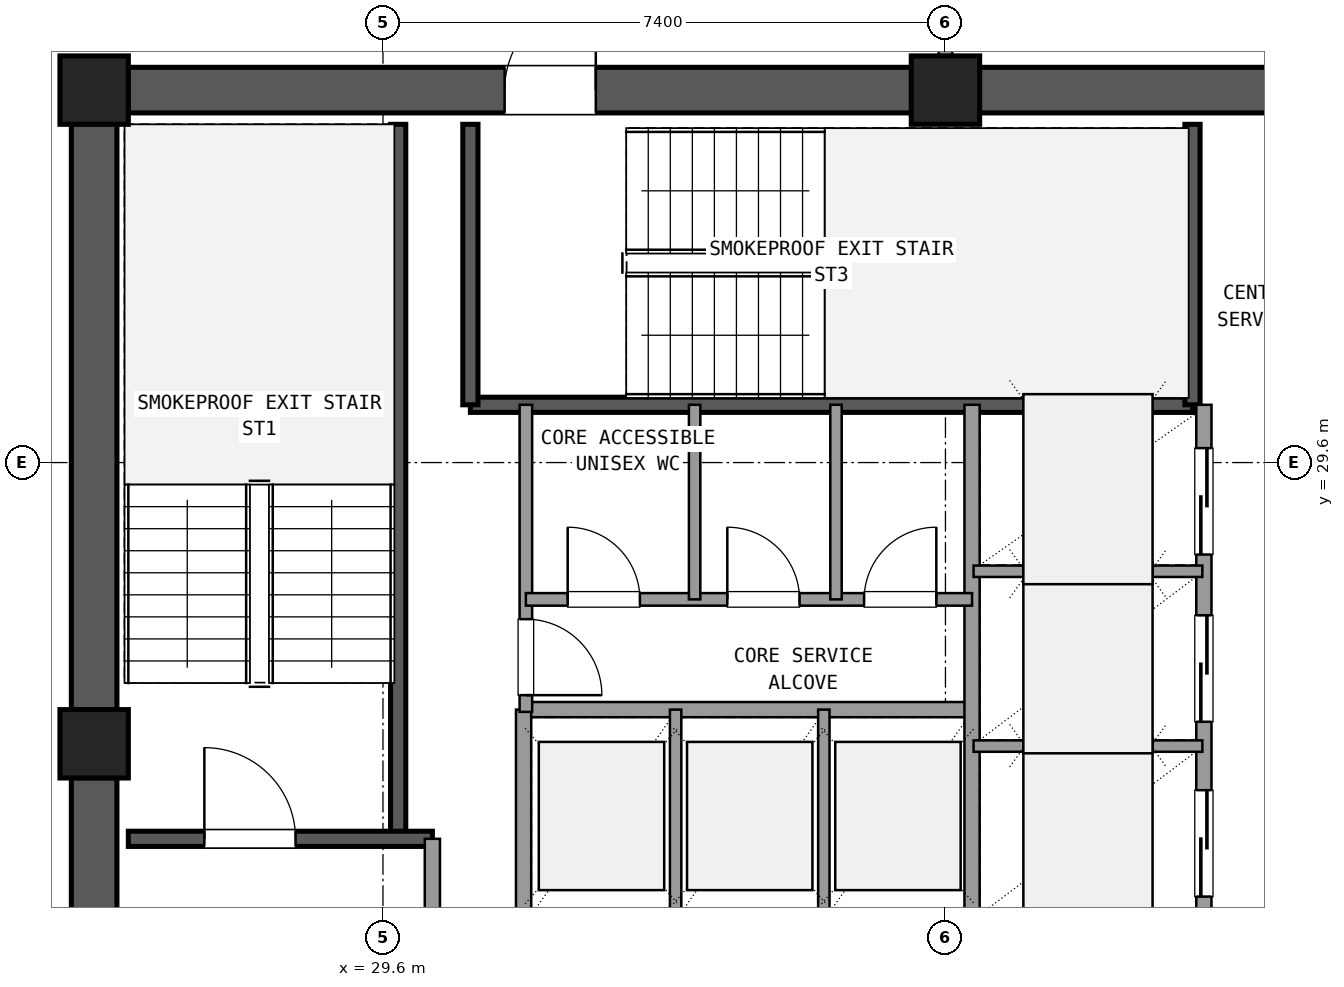
"""IFC4 building model, lengths in metres.
Left out: names, types, materials, properties, quantities, classifications, styles, units other than length and angle.
Written with IfcOpenShell. Run it as: python <this file> out.ifc"""

import sys

from ifc_helpers import new_model, si_unit, direction, frame, frame_2d, origin, origin_2d, place, context, subcontext, project, spatial, rectangle, extrude, element, fill, save


model = new_model("IFC4")
c1 = context("Model", 3, precision=1e-05, world=origin(), true_north=direction((0.0, 1.0)))
c2 = subcontext(c1, "Body", "Model", "MODEL_VIEW")
j1 = project(units=[si_unit("LENGTHUNIT", "METRE"), si_unit("PLANEANGLEUNIT", "RADIAN")], contexts=[c1])
p1 = place(None, origin())
s1 = spatial("IfcSite", under=j1, at=p1, CompositionType="ELEMENT")
p2 = place(p1, origin())
s2 = spatial("IfcBuilding", under=s1, at=p2, CompositionType="ELEMENT")
p3 = place(p2, frame((0.0, 0.0, 214.38)))
s3 = spatial("IfcBuildingStorey", under=s2, at=p3, CompositionType="ELEMENT", Elevation=214.38)
for number, where, z_axis, x_axis in (
    (1, (37.0, 34.5, 0.0), (0.0, 0.0, 1.0), (1.0, 0.0, 0.0)),
    (2, (25.8, 34.5, 0.0), (0.0, 0.0, 1.0), (1.0, 0.0, 0.0)),
    (3, (25.8, 25.9, 0.0), (0.0, 0.0, 1.0), (1.0, 0.0, 0.0)),
):
    element("IfcColumn", number, at=place(p3, frame(where, z_axis=z_axis, x_axis=x_axis)), inside=s3, PredefinedType="COLUMN", context=c2, shape_type="SweptSolid", body=[
        extrude(rectangle(XDim=0.9, YDim=0.9, at=origin_2d()), origin(), (0.0, 0.0, 1.0), 3.6),
    ])
p4 = place(p3, frame((47.755, 34.5, 0.0), z_axis=(0.0, 0.0, 1.0), x_axis=(-1.0, 0.0, 0.0)))
e4 = element("IfcWall", 4, at=p4, inside=s3, PredefinedType="SHEAR", context=c2, shape_type="SweptSolid", body=[
    extrude(rectangle(XDim=10.31, YDim=0.6, at=frame_2d((5.155, 0.0))), origin(), (0.0, 0.0, 1.0), 3.32),
])
p5 = place(p4, frame((4.655, 0.0, 0.0)))
e5 = element("IfcOpeningElement", 5, at=p5, cuts=e4, PredefinedType="OPENING", context=c2, shape_type="SweptSolid", body=[
    extrude(rectangle(XDim=1.6, YDim=2.2, at=frame_2d((0.8, 1.1))), frame((0.0, 0.31, 0.0), z_axis=(0.0, -1.0, 0.0), x_axis=(1.0, 0.0, 0.0)), (0.0, 0.0, 1.0), 0.62),
])
p6 = place(p3, frame((36.555, 34.5, 0.0), z_axis=(0.0, 0.0, 1.0), x_axis=(-1.0, 0.0, 0.0)))
e6 = element("IfcWall", 6, at=p6, inside=s3, PredefinedType="SHEAR", context=c2, shape_type="SweptSolid", body=[
    extrude(rectangle(XDim=10.31, YDim=0.6, at=frame_2d((5.155, 0.0))), origin(), (0.0, 0.0, 1.0), 3.32),
])
p7 = place(p6, frame((4.155, 0.0, 0.0)))
e7 = element("IfcOpeningElement", 7, at=p7, cuts=e6, PredefinedType="OPENING", context=c2, shape_type="SweptSolid", body=[
    extrude(rectangle(XDim=1.2, YDim=2.15, at=frame_2d((0.6, 1.075))), frame((0.0, 0.31, 0.0), z_axis=(0.0, -1.0, 0.0), x_axis=(1.0, 0.0, 0.0)), (0.0, 0.0, 1.0), 0.62),
])
p8 = place(p3, frame((25.8, 34.055, 0.0), z_axis=(0.0, 0.0, 1.0), x_axis=(0.0, -1.0, 0.0)))
e8 = element("IfcWall", 8, at=p8, inside=s3, PredefinedType="SHEAR", context=c2, shape_type="SweptSolid", body=[
    extrude(rectangle(XDim=7.71, YDim=0.6, at=frame_2d((3.855, 0.0))), origin(), (0.0, 0.0, 1.0), 3.32),
])
p9 = place(p3, frame((25.8, 25.455, 0.0), z_axis=(0.0, 0.0, 1.0), x_axis=(0.0, -1.0, 0.0)))
e9 = element("IfcWall", 9, at=p9, inside=s3, PredefinedType="SHEAR", context=c2, shape_type="SweptSolid", body=[
    extrude(rectangle(XDim=7.71, YDim=0.6, at=frame_2d((3.855, 0.0))), origin(), (0.0, 0.0, 1.0), 3.32),
])
p10 = place(p9, frame((2.205, 0.0, 0.0)))
e10 = element("IfcOpeningElement", 10, at=p10, cuts=e9, PredefinedType="OPENING", context=c2, shape_type="SweptSolid", body=[
    extrude(rectangle(XDim=1.2, YDim=2.15, at=frame_2d((0.6, 1.075))), frame((0.0, 0.31, 0.0), z_axis=(0.0, -1.0, 0.0), x_axis=(1.0, 0.0, 0.0)), (0.0, 0.0, 1.0), 0.62),
])
p11 = place(p3, frame((29.8, 24.65, 0.0), z_axis=(0.0, 0.0, 1.0), x_axis=(0.0, 1.0, 0.0)))
e11 = element("IfcWall", 11, at=p11, inside=s3, PredefinedType="SHEAR", context=c2, shape_type="SweptSolid", body=[
    extrude(rectangle(XDim=9.4, YDim=0.2, at=frame_2d((4.7, 0.0))), origin(), (0.0, 0.0, 1.0), 3.32),
])
p12 = place(p3, frame((26.25, 24.65, 0.0), z_axis=(0.0, 0.0, 1.0), x_axis=(1.0, 0.0, 0.0)))
e12 = element("IfcWall", 12, at=p12, inside=s3, PredefinedType="SHEAR", context=c2, shape_type="SweptSolid", body=[
    extrude(rectangle(XDim=4.0, YDim=0.2, at=frame_2d((2.0, 0.0))), origin(), (0.0, 0.0, 1.0), 3.32),
])
p13 = place(p12, frame((1.0, 0.0, 0.0)))
e13 = element("IfcOpeningElement", 13, at=p13, cuts=e12, PredefinedType="OPENING", context=c2, shape_type="SweptSolid", body=[
    extrude(rectangle(XDim=1.2, YDim=2.15, at=frame_2d((0.6, 1.075))), frame((0.0, 0.11, 0.0), z_axis=(0.0, -1.0, 0.0), x_axis=(1.0, 0.0, 0.0)), (0.0, 0.0, 1.0), 0.22),
])
p14 = place(p3, frame((30.75, 30.36, 0.0), z_axis=(0.0, 0.0, 1.0), x_axis=(1.0, 0.0, 0.0)))
e14 = element("IfcWall", 14, at=p14, inside=s3, PredefinedType="SHEAR", context=c2, shape_type="SweptSolid", body=[
    extrude(rectangle(XDim=9.5, YDim=0.2, at=frame_2d((4.75, 0.0))), origin(), (0.0, 0.0, 1.0), 3.32),
])
for number, where, z_axis, x_axis in (
    (15, (30.75, 30.36, 0.0), (0.0, 0.0, 1.0), (0.0, 1.0, 0.0)),
    (16, (40.25, 30.36, 0.0), (0.0, 0.0, 1.0), (0.0, 1.0, 0.0)),
):
    element("IfcWall", number, at=place(p3, frame(where, z_axis=z_axis, x_axis=x_axis)), inside=s3, PredefinedType="SHEAR", context=c2, shape_type="SweptSolid", body=[
        extrude(rectangle(XDim=3.69, YDim=0.2, at=frame_2d((1.845, 0.0))), origin(), (0.0, 0.0, 1.0), 3.32),
    ])
p15 = place(p3, frame((30.25, 17.75, 0.0), z_axis=(0.0, 0.0, 1.0), x_axis=(0.0, 1.0, 0.0)))
e17 = element("IfcWall", 17, at=p15, inside=s3, PredefinedType="SOLIDWALL", context=c2, shape_type="SweptSolid", body=[
    extrude(rectangle(XDim=6.9, YDim=0.2, at=frame_2d((3.45, 0.0))), origin(), (0.0, 0.0, 1.0), 2.61),
])
p16 = place(p15, frame((4.15, 0.0, 0.0)))
e18 = element("IfcOpeningElement", 18, at=p16, cuts=e17, PredefinedType="OPENING", context=c2, shape_type="SweptSolid", body=[
    extrude(rectangle(XDim=1.2, YDim=2.15, at=frame_2d((0.6, 1.075))), frame((0.0, 0.11, 0.0), z_axis=(0.0, -1.0, 0.0), x_axis=(1.0, 0.0, 0.0)), (0.0, 0.0, 1.0), 0.22),
])
p17 = place(p3, frame((31.45, 26.35, 0.0), z_axis=(0.0, 0.0, 1.0), x_axis=(1.0, 0.0, 0.0)))
e19 = element("IfcWall", 19, at=p17, inside=s3, PredefinedType="SOLIDWALL", context=c2, shape_type="SweptSolid", body=[
    extrude(rectangle(XDim=5.9, YDim=0.2, at=frame_2d((2.95, 0.0))), origin(), (0.0, 0.0, 1.0), 2.61),
])
p18 = place(p3, frame((31.45, 23.54, 0.0), z_axis=(0.0, 0.0, 1.0), x_axis=(0.0, 1.0, 0.0)))
e20 = element("IfcWall", 20, at=p18, inside=s3, PredefinedType="SOLIDWALL", context=c2, shape_type="SweptSolid", body=[
    extrude(rectangle(XDim=2.81, YDim=0.2, at=frame_2d((1.405, 0.0))), origin(), (0.0, 0.0, 1.0), 2.61),
])
for number, where, z_axis, x_axis in (
    (21, (33.45, 23.54, 0.0), (0.0, 0.0, 1.0), (0.0, 1.0, 0.0)),
    (22, (35.4, 23.54, 0.0), (0.0, 0.0, 1.0), (0.0, 1.0, 0.0)),
):
    element("IfcWall", number, at=place(p3, frame(where, z_axis=z_axis, x_axis=x_axis)), inside=s3, PredefinedType="PARTITIONING", context=c2, shape_type="SweptSolid", body=[
        extrude(rectangle(XDim=2.81, YDim=0.15, at=frame_2d((1.405, 0.0))), origin(), (0.0, 0.0, 1.0), 2.61),
    ])
p19 = place(p3, frame((37.35, 23.54, 0.0), z_axis=(0.0, 0.0, 1.0), x_axis=(0.0, 1.0, 0.0)))
e23 = element("IfcWall", 23, at=p19, inside=s3, PredefinedType="SOLIDWALL", context=c2, shape_type="SweptSolid", body=[
    extrude(rectangle(XDim=6.82, YDim=0.2, at=frame_2d((3.41, 0.0))), origin(), (0.0, 0.0, 1.0), 2.61),
])
p20 = place(p3, frame((40.4, 23.54, 0.0), z_axis=(0.0, 0.0, 1.0), x_axis=(0.0, 1.0, 0.0)))
e24 = element("IfcWall", 24, at=p20, inside=s3, PredefinedType="SOLIDWALL", context=c2, shape_type="SweptSolid", body=[
    extrude(rectangle(XDim=6.82, YDim=0.2, at=frame_2d((3.41, 0.0))), origin(), (0.0, 0.0, 1.0), 2.61),
])
p21 = place(p20, frame((0.35, 0.0, 0.0)))
e25 = element("IfcOpeningElement", 25, at=p21, cuts=e24, PredefinedType="OPENING", context=c2, shape_type="SweptSolid", body=[
    extrude(rectangle(XDim=1.4, YDim=2.2, at=frame_2d((0.7, 1.1))), frame((0.0, 0.11, 0.0), z_axis=(0.0, -1.0, 0.0), x_axis=(1.0, 0.0, 0.0)), (0.0, 0.0, 1.0), 0.22),
])
p22 = place(p20, frame((2.65, 0.0, 0.0)))
e26 = element("IfcOpeningElement", 26, at=p22, cuts=e24, PredefinedType="OPENING", context=c2, shape_type="SweptSolid", body=[
    extrude(rectangle(XDim=1.4, YDim=2.2, at=frame_2d((0.7, 1.1))), frame((0.0, 0.11, 0.0), z_axis=(0.0, -1.0, 0.0), x_axis=(1.0, 0.0, 0.0)), (0.0, 0.0, 1.0), 0.22),
])
p23 = place(p20, frame((4.85, 0.0, 0.0)))
e27 = element("IfcOpeningElement", 27, at=p23, cuts=e24, PredefinedType="OPENING", context=c2, shape_type="SweptSolid", body=[
    extrude(rectangle(XDim=1.4, YDim=2.2, at=frame_2d((0.7, 1.1))), frame((0.0, 0.11, 0.0), z_axis=(0.0, -1.0, 0.0), x_axis=(1.0, 0.0, 0.0)), (0.0, 0.0, 1.0), 0.22),
])
for number, where, z_axis, x_axis in (
    (28, (37.37, 25.87, 0.0), (0.0, 0.0, 1.0), (1.0, 0.0, 0.0)),
    (29, (37.37, 28.17, 0.0), (0.0, 0.0, 1.0), (1.0, 0.0, 0.0)),
):
    element("IfcWall", number, at=place(p3, frame(where, z_axis=z_axis, x_axis=x_axis)), inside=s3, PredefinedType="PARTITIONING", context=c2, shape_type="SweptSolid", body=[
        extrude(rectangle(XDim=3.01, YDim=0.15, at=frame_2d((1.505, 0.0))), origin(), (0.0, 0.0, 1.0), 2.61),
    ])
p24 = place(p3, frame((31.48, 26.32, 0.0), z_axis=(0.0, 0.0, 1.0), x_axis=(0.0, 1.0, 0.0)))
e30 = element("IfcWall", 30, at=p24, inside=s3, PredefinedType="PLUMBINGWALL", context=c2, shape_type="SweptSolid", body=[
    extrude(rectangle(XDim=4.04, YDim=0.165, at=frame_2d((2.02, 0.0))), origin(), (0.0, 0.0, 1.0), 2.61),
])
p25 = place(p24, frame((0.22, 0.0, 0.0)))
e31 = element("IfcOpeningElement", 31, at=p25, cuts=e30, PredefinedType="OPENING", context=c2, shape_type="SweptSolid", body=[
    extrude(rectangle(XDim=1.0, YDim=2.15, at=frame_2d((0.5, 1.075))), frame((0.0, 0.093, 0.0), z_axis=(0.0, -1.0, 0.0), x_axis=(1.0, 0.0, 0.0)), (0.0, 0.0, 1.0), 0.185),
])
p26 = place(p3, frame((31.48, 27.8, 0.0), z_axis=(0.0, 0.0, 1.0), x_axis=(1.0, 0.0, 0.0)))
e32 = element("IfcWall", 32, at=p26, inside=s3, PredefinedType="PLUMBINGWALL", context=c2, shape_type="SweptSolid", body=[
    extrude(rectangle(XDim=5.87, YDim=0.165, at=frame_2d((2.935, 0.0))), origin(), (0.0, 0.0, 1.0), 2.61),
])
p27 = place(p26, frame((0.55, 0.0, 0.0)))
e33 = element("IfcOpeningElement", 33, at=p27, cuts=e32, PredefinedType="OPENING", context=c2, shape_type="SweptSolid", body=[
    extrude(rectangle(XDim=0.95, YDim=2.1, at=frame_2d((0.475, 1.05))), frame((0.0, 0.093, 0.0), z_axis=(0.0, -1.0, 0.0), x_axis=(1.0, 0.0, 0.0)), (0.0, 0.0, 1.0), 0.185),
])
p28 = place(p26, frame((2.65, 0.0, 0.0)))
e34 = element("IfcOpeningElement", 34, at=p28, cuts=e32, PredefinedType="OPENING", context=c2, shape_type="SweptSolid", body=[
    extrude(rectangle(XDim=0.95, YDim=2.1, at=frame_2d((0.475, 1.05))), frame((0.0, 0.093, 0.0), z_axis=(0.0, -1.0, 0.0), x_axis=(1.0, 0.0, 0.0)), (0.0, 0.0, 1.0), 0.185),
])
p29 = place(p26, frame((4.45, 0.0, 0.0)))
e35 = element("IfcOpeningElement", 35, at=p29, cuts=e32, PredefinedType="OPENING", context=c2, shape_type="SweptSolid", body=[
    extrude(rectangle(XDim=0.95, YDim=2.1, at=frame_2d((0.475, 1.05))), frame((0.0, 0.093, 0.0), z_axis=(0.0, -1.0, 0.0), x_axis=(1.0, 0.0, 0.0)), (0.0, 0.0, 1.0), 0.185),
])
for number, where, z_axis, x_axis in (
    (36, (33.7, 27.8, 0.0), (0.0, 0.0, 1.0), (0.0, 1.0, 0.0)),
    (37, (35.56, 27.8, 0.0), (0.0, 0.0, 1.0), (0.0, 1.0, 0.0)),
):
    element("IfcWall", number, at=place(p3, frame(where, z_axis=z_axis, x_axis=x_axis)), inside=s3, PredefinedType="PARTITIONING", context=c2, shape_type="SweptSolid", body=[
        extrude(rectangle(XDim=2.56, YDim=0.15, at=frame_2d((1.28, 0.0))), origin(), (0.0, 0.0, 1.0), 2.61),
    ])
p30 = place(p3, frame((37.0, 34.95, 0.0), z_axis=(0.0, 0.0, 1.0), x_axis=(0.0, 1.0, 0.0)))
e38 = element("IfcWall", 38, at=p30, inside=s3, PredefinedType="PARTITIONING", context=c2, shape_type="SweptSolid", body=[
    extrude(rectangle(XDim=2.7, YDim=0.18, at=frame_2d((1.35, 0.0))), origin(), (0.0, 0.0, 1.0), 2.61),
])
p31 = place(p30, frame((0.35, 0.0, 0.0)))
e39 = element("IfcOpeningElement", 39, at=p31, cuts=e38, PredefinedType="OPENING", context=c2, shape_type="SweptSolid", body=[
    extrude(rectangle(XDim=2.0, YDim=2.2, at=frame_2d((1.0, 1.1))), frame((0.0, 0.1, 0.0), z_axis=(0.0, -1.0, 0.0), x_axis=(1.0, 0.0, 0.0)), (0.0, 0.0, 1.0), 0.2),
])
p32 = place(p13, origin())
e40 = element("IfcDoor", 40, at=p32, inside=s3, OperationType="SINGLE_SWING_LEFT", PredefinedType="DOOR", context=c2, shape_type="SweptSolid", body=[
    extrude(rectangle(XDim=1.2, YDim=2.15, at=frame_2d((0.6, 1.075))), frame((0.0, 0.025, 0.0), z_axis=(0.0, -1.0, 0.0), x_axis=(1.0, 0.0, 0.0)), (0.0, 0.0, 1.0), 0.05),
])
fill(e13, e40)
p33 = place(p7, frame((1.2, 0.0, 0.0), z_axis=(0.0, 0.0, 1.0), x_axis=(-1.0, 0.0, 0.0)))
e41 = element("IfcDoor", 41, at=p33, inside=s3, OperationType="SINGLE_SWING_LEFT", PredefinedType="DOOR", context=c2, shape_type="SweptSolid", body=[
    extrude(rectangle(XDim=1.2, YDim=2.15, at=frame_2d((0.6, 1.075))), frame((0.0, 0.025, 0.0), z_axis=(0.0, -1.0, 0.0), x_axis=(1.0, 0.0, 0.0)), (0.0, 0.0, 1.0), 0.05),
])
fill(e7, e41)
p34 = place(p21, origin())
e42 = element("IfcDoor", 42, at=p34, inside=s3, OperationType="SLIDING_TO_LEFT", PredefinedType="DOOR", context=c2, shape_type="SweptSolid", body=[
    extrude(rectangle(XDim=1.4, YDim=2.2, at=frame_2d((0.7, 1.1))), frame((0.0, 0.025, 0.0), z_axis=(0.0, -1.0, 0.0), x_axis=(1.0, 0.0, 0.0)), (0.0, 0.0, 1.0), 0.05),
])
fill(e25, e42)
p35 = place(p22, origin())
e43 = element("IfcDoor", 43, at=p35, inside=s3, OperationType="SLIDING_TO_LEFT", PredefinedType="DOOR", context=c2, shape_type="SweptSolid", body=[
    extrude(rectangle(XDim=1.4, YDim=2.2, at=frame_2d((0.7, 1.1))), frame((0.0, 0.025, 0.0), z_axis=(0.0, -1.0, 0.0), x_axis=(1.0, 0.0, 0.0)), (0.0, 0.0, 1.0), 0.05),
])
fill(e26, e43)
p36 = place(p23, origin())
e44 = element("IfcDoor", 44, at=p36, inside=s3, OperationType="SLIDING_TO_RIGHT", PredefinedType="DOOR", context=c2, shape_type="SweptSolid", body=[
    extrude(rectangle(XDim=1.4, YDim=2.2, at=frame_2d((0.7, 1.1))), frame((0.0, 0.025, 0.0), z_axis=(0.0, -1.0, 0.0), x_axis=(1.0, 0.0, 0.0)), (0.0, 0.0, 1.0), 0.05),
])
fill(e27, e44)
p37 = place(p25, frame((1.0, 0.0, 0.0), z_axis=(0.0, 0.0, 1.0), x_axis=(-1.0, 0.0, 0.0)))
e45 = element("IfcDoor", 45, at=p37, inside=s3, OperationType="SINGLE_SWING_LEFT", PredefinedType="DOOR", context=c2, shape_type="SweptSolid", body=[
    extrude(rectangle(XDim=1.0, YDim=2.15, at=frame_2d((0.5, 1.075))), frame((0.0, 0.025, 0.0), z_axis=(0.0, -1.0, 0.0), x_axis=(1.0, 0.0, 0.0)), (0.0, 0.0, 1.0), 0.05),
])
fill(e31, e45)
p38 = place(p27, origin())
e46 = element("IfcDoor", 46, at=p38, inside=s3, OperationType="SINGLE_SWING_LEFT", PredefinedType="DOOR", context=c2, shape_type="SweptSolid", body=[
    extrude(rectangle(XDim=0.95, YDim=2.1, at=frame_2d((0.475, 1.05))), frame((0.0, 0.025, 0.0), z_axis=(0.0, -1.0, 0.0), x_axis=(1.0, 0.0, 0.0)), (0.0, 0.0, 1.0), 0.05),
])
fill(e33, e46)
p39 = place(p28, origin())
e47 = element("IfcDoor", 47, at=p39, inside=s3, OperationType="SINGLE_SWING_LEFT", PredefinedType="DOOR", context=c2, shape_type="SweptSolid", body=[
    extrude(rectangle(XDim=0.95, YDim=2.1, at=frame_2d((0.475, 1.05))), frame((0.0, 0.025, 0.0), z_axis=(0.0, -1.0, 0.0), x_axis=(1.0, 0.0, 0.0)), (0.0, 0.0, 1.0), 0.05),
])
fill(e34, e47)
p40 = place(p29, origin())
e48 = element("IfcDoor", 48, at=p40, inside=s3, OperationType="SINGLE_SWING_RIGHT", PredefinedType="DOOR", context=c2, shape_type="SweptSolid", body=[
    extrude(rectangle(XDim=0.95, YDim=2.1, at=frame_2d((0.475, 1.05))), frame((0.0, 0.025, 0.0), z_axis=(0.0, -1.0, 0.0), x_axis=(1.0, 0.0, 0.0)), (0.0, 0.0, 1.0), 0.05),
])
fill(e35, e48)
save(model, sys.argv[1])
